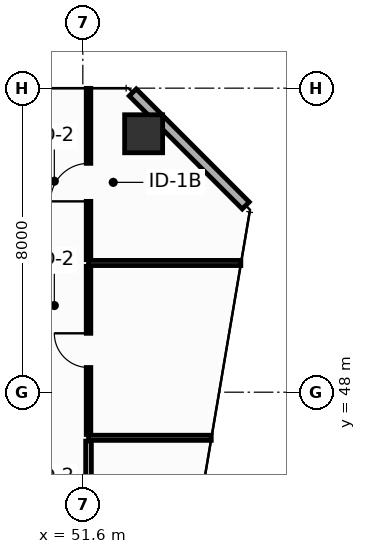
"""IFC4 building model, lengths in metres.
Left out: names, types, materials, properties, quantities, classifications, styles, units other than length and angle.
Written with IfcOpenShell. Run it as: python <this file> out.ifc"""

import sys

from ifc_helpers import new_model, si_unit, direction, frame, frame_2d, origin, origin_2d, place, context, subcontext, project, spatial, rectangle, hollow_rectangle, extrude, element, fill, save


model = new_model("IFC4")
c1 = context("Model", 3, precision=1e-05, world=origin(), true_north=direction((0.0, 1.0)))
c2 = subcontext(c1, "Body", "Model", "MODEL_VIEW")
j1 = project(units=[si_unit("LENGTHUNIT", "METRE"), si_unit("PLANEANGLEUNIT", "RADIAN")], contexts=[c1])
p1 = place(None, origin())
s1 = spatial("IfcSite", under=j1, at=p1, CompositionType="ELEMENT")
p2 = place(p1, origin())
s2 = spatial("IfcBuilding", under=s1, at=p2, CompositionType="ELEMENT")
p3 = place(p2, frame((0.0, 0.0, 179.0)))
s3 = spatial("IfcBuildingStorey", under=s2, at=p3, CompositionType="ELEMENT", Elevation=179.0)
p4 = place(p3, frame((53.2, 54.8, 0.0), z_axis=(0.0, 0.0, 1.0), x_axis=(1.0, 0.0, 0.0)))
e1 = element("IfcColumn", 1, at=p4, inside=s3, PredefinedType="COLUMN", context=c2, shape_type="SweptSolid", body=[
    extrude(hollow_rectangle(XDim=1.0, YDim=1.0, WallThickness=0.045, at=origin_2d()), origin(), (0.0, 0.0, 1.0), 3.8),
])
p5 = place(p3, frame((55.887, 52.913, 0.0), z_axis=(0.0, 0.0, 1.0), x_axis=(-0.707106781187, 0.707106781187, 0.0)))
e2 = element("IfcWall", 2, at=p5, inside=s3, PredefinedType="STANDARD", context=c2, shape_type="SweptSolid", body=[
    extrude(rectangle(XDim=4.206, YDim=0.26, at=frame_2d((2.103, 0.0))), origin(), (0.0, 0.0, 1.0), 3.55),
])
p6 = place(p3, frame((51.75, 46.8, 0.0), z_axis=(0.0, 0.0, 1.0), x_axis=(1.0, 0.0, 0.0)))
e3 = element("IfcWall", 3, at=p6, inside=s3, PredefinedType="PARTITIONING", context=c2, shape_type="SweptSolid", body=[
    extrude(rectangle(XDim=3.229, YDim=0.135, at=frame_2d((1.615, 0.0))), origin(), (0.0, 0.0, 1.0), 2.835),
])
p7 = place(p3, frame((51.75, 51.4, 0.0), z_axis=(0.0, 0.0, 1.0), x_axis=(1.0, 0.0, 0.0)))
e4 = element("IfcWall", 4, at=p7, inside=s3, PredefinedType="PARTITIONING", context=c2, shape_type="SweptSolid", body=[
    extrude(rectangle(XDim=4.008, YDim=0.135, at=frame_2d((2.004, 0.0))), origin(), (0.0, 0.0, 1.0), 2.835),
])
p8 = place(p3, frame((51.75, 41.038, 0.0), z_axis=(0.0, 0.0, 1.0), x_axis=(0.0, 1.0, 0.0)))
e5 = element("IfcWall", 5, at=p8, inside=s3, PredefinedType="PARTITIONING", context=c2, shape_type="SweptSolid", body=[
    extrude(rectangle(XDim=5.675, YDim=0.15, at=frame_2d((2.837, 0.0))), origin(), (0.0, 0.0, 1.0), 2.835),
])
p9 = place(p8, frame((2.312, 0.0, 0.0)))
e6 = element("IfcOpeningElement", 6, at=p9, cuts=e5, PredefinedType="OPENING", context=c2, shape_type="SweptSolid", body=[
    extrude(rectangle(XDim=1.05, YDim=2.15, at=frame_2d((0.525, 1.075))), frame((0.0, 0.085, 0.0), z_axis=(0.0, -1.0, 0.0), x_axis=(1.0, 0.0, 0.0)), (0.0, 0.0, 1.0), 0.17),
])
p10 = place(p3, frame((51.75, 46.887, 0.0), z_axis=(0.0, 0.0, 1.0), x_axis=(0.0, 1.0, 0.0)))
e7 = element("IfcWall", 7, at=p10, inside=s3, PredefinedType="PARTITIONING", context=c2, shape_type="SweptSolid", body=[
    extrude(rectangle(XDim=4.425, YDim=0.12, at=frame_2d((2.212, 0.0))), origin(), (0.0, 0.0, 1.0), 3.55),
])
p11 = place(p10, frame((1.762, 0.0, 0.0)))
e8 = element("IfcOpeningElement", 8, at=p11, cuts=e7, PredefinedType="OPENING", context=c2, shape_type="SweptSolid", body=[
    extrude(rectangle(XDim=0.9, YDim=2.1, at=frame_2d((0.45, 1.05))), frame((0.0, 0.07, 0.0), z_axis=(0.0, -1.0, 0.0), x_axis=(1.0, 0.0, 0.0)), (0.0, 0.0, 1.0), 0.14),
])
p12 = place(p3, frame((51.75, 51.488, 0.0), z_axis=(0.0, 0.0, 1.0), x_axis=(0.0, 1.0, 0.0)))
e9 = element("IfcWall", 9, at=p12, inside=s3, PredefinedType="PARTITIONING", context=c2, shape_type="SweptSolid", body=[
    extrude(rectangle(XDim=4.508, YDim=0.12, at=frame_2d((2.254, 0.0))), origin(), (0.0, 0.0, 1.0), 2.935),
])
p13 = place(p12, frame((1.534, 0.0, 0.0)))
e10 = element("IfcOpeningElement", 10, at=p13, cuts=e9, PredefinedType="OPENING", context=c2, shape_type="SweptSolid", body=[
    extrude(rectangle(XDim=1.0, YDim=2.15, at=frame_2d((0.5, 1.075))), frame((0.0, 0.07, 0.0), z_axis=(0.0, -1.0, 0.0), x_axis=(1.0, 0.0, 0.0)), (0.0, 0.0, 1.0), 0.14),
])
p14 = place(p11, origin())
e11 = element("IfcDoor", 11, at=p14, inside=s3, OperationType="SINGLE_SWING_RIGHT", PredefinedType="DOOR", context=c2, shape_type="SweptSolid", body=[
    extrude(rectangle(XDim=0.9, YDim=2.1, at=frame_2d((0.45, 1.05))), frame((0.0, 0.025, 0.0), z_axis=(0.0, -1.0, 0.0), x_axis=(1.0, 0.0, 0.0)), (0.0, 0.0, 1.0), 0.05),
])
fill(e8, e11)
p15 = place(p13, origin())
e12 = element("IfcDoor", 12, at=p15, inside=s3, OperationType="SINGLE_SWING_LEFT", PredefinedType="DOOR", context=c2, shape_type="SweptSolid", body=[
    extrude(rectangle(XDim=1.0, YDim=2.15, at=frame_2d((0.5, 1.075))), frame((0.0, 0.025, 0.0), z_axis=(0.0, -1.0, 0.0), x_axis=(1.0, 0.0, 0.0)), (0.0, 0.0, 1.0), 0.05),
])
fill(e10, e12)
save(model, sys.argv[1])
